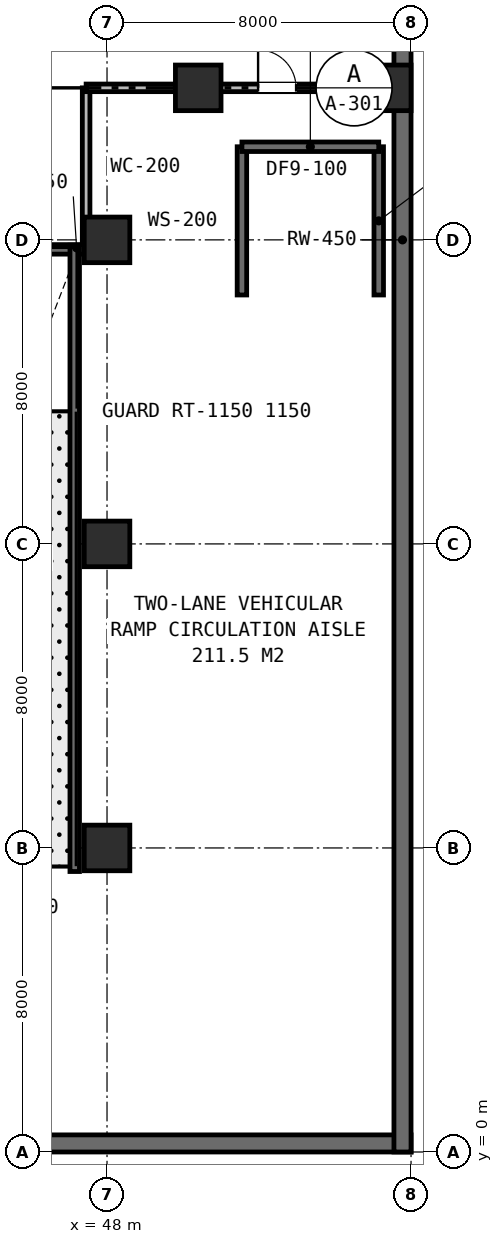
"""IFC4 building model, lengths in metres.
Left out: names, types, materials, properties, quantities, classifications, styles, units other than length and angle.
Written with IfcOpenShell. Run it as: python <this file> out.ifc"""

import sys

from ifc_helpers import new_model, si_unit, direction, frame, frame_2d, origin, origin_2d, place, context, subcontext, project, spatial, rectangle, extrude, element, fill, save


model = new_model("IFC4")
c1 = context("Model", 3, precision=1e-05, world=origin(), true_north=direction((0.0, 1.0)))
c2 = subcontext(c1, "Body", "Model", "MODEL_VIEW")
j1 = project(units=[si_unit("LENGTHUNIT", "METRE"), si_unit("PLANEANGLEUNIT", "RADIAN")], contexts=[c1])
p1 = place(None, origin())
s1 = spatial("IfcSite", under=j1, at=p1, CompositionType="ELEMENT")
p2 = place(p1, origin())
s2 = spatial("IfcBuilding", under=s1, at=p2, CompositionType="ELEMENT")
p3 = place(p2, frame((0.0, 0.0, -9.4)))
s3 = spatial("IfcBuildingStorey", under=s2, at=p3, CompositionType="ELEMENT", Elevation=-9.4)
p4 = place(p3, frame((0.0, 0.225, 0.0), z_axis=(0.0, 0.0, 1.0), x_axis=(1.0, 0.0, 0.0)))
e1 = element("IfcWall", 1, at=p4, inside=s3, PredefinedType="USERDEFINED", context=c2, shape_type="SweptSolid", body=[
    extrude(rectangle(XDim=56.0, YDim=0.45, at=frame_2d((28.0, 0.0))), origin(), (0.0, 0.0, 1.0), 3.8),
])
p5 = place(p3, frame((55.775, 0.0, 0.0), z_axis=(0.0, 0.0, 1.0), x_axis=(0.0, 1.0, 0.0)))
e2 = element("IfcWall", 2, at=p5, inside=s3, PredefinedType="USERDEFINED", context=c2, shape_type="SweptSolid", body=[
    extrude(rectangle(XDim=48.0, YDim=0.45, at=frame_2d((24.0, 0.0))), origin(), (0.0, 0.0, 1.0), 3.8),
])
for number, where, z_axis, x_axis in (
    (3, (50.4, 28.0, 0.0), (0.0, 0.0, 1.0), (1.0, 0.0, 0.0)),
    (4, (55.4, 28.0, 0.0), (0.0, 0.0, 1.0), (1.0, 0.0, 0.0)),
    (5, (48.0, 8.0, 0.0), (0.0, 0.0, 1.0), (1.0, 0.0, 0.0)),
    (6, (48.0, 16.0, 0.0), (0.0, 0.0, 1.0), (1.0, 0.0, 0.0)),
    (7, (48.0, 24.0, 0.0), (0.0, 0.0, 1.0), (1.0, 0.0, 0.0)),
):
    element("IfcColumn", number, at=place(p3, frame(where, z_axis=z_axis, x_axis=x_axis)), inside=s3, PredefinedType="COLUMN", context=c2, shape_type="SweptSolid", body=[
        extrude(rectangle(XDim=1.2, YDim=1.2, at=origin_2d()), origin(), (0.0, 0.0, 1.0), 3.8),
    ])
p6 = place(p3, frame((47.45, 23.85, 0.0), z_axis=(0.0, 0.0, 1.0), x_axis=(0.0, 1.0, 0.0)))
e8 = element("IfcWall", 8, at=p6, inside=s3, PredefinedType="PARTITIONING", context=c2, shape_type="SweptSolid", body=[
    extrude(rectangle(XDim=4.15, YDim=0.2, at=frame_2d((2.075, 0.0))), origin(), (0.0, 0.0, 1.0), 2.88),
])
p7 = place(p3, frame((47.45, 28.0, 0.0), z_axis=(0.0, 0.0, 1.0), x_axis=(1.0, 0.0, 0.0)))
e9 = element("IfcWall", 9, at=p7, inside=s3, PredefinedType="PARTITIONING", context=c2, shape_type="SweptSolid", body=[
    extrude(rectangle(XDim=8.0, YDim=0.2, at=frame_2d((4.0, 0.0))), origin(), (0.0, 0.0, 1.0), 2.88),
])
p8 = place(p7, frame((4.525, 0.0, 0.0)))
e10 = element("IfcOpeningElement", 10, at=p8, cuts=e9, PredefinedType="OPENING", context=c2, shape_type="SweptSolid", body=[
    extrude(rectangle(XDim=1.0, YDim=2.15, at=frame_2d((0.5, 1.075))), frame((0.0, 0.11, 0.0), z_axis=(0.0, -1.0, 0.0), x_axis=(1.0, 0.0, 0.0)), (0.0, 0.0, 1.0), 0.22),
])
p9 = place(p3, frame((40.0, 23.75, 0.0), z_axis=(0.0, 0.0, 1.0), x_axis=(1.0, 0.0, 0.0)))
e11 = element("IfcWall", 11, at=p9, inside=s3, PredefinedType="STANDARD", context=c2, shape_type="SweptSolid", body=[
    extrude(rectangle(XDim=8.0, YDim=0.25, at=frame_2d((4.0, 0.0))), origin(), (0.0, 0.0, 1.0), 3.5),
])
p10 = place(p3, frame((47.15, 7.38, 0.0), z_axis=(0.0, 0.0, 1.0), x_axis=(0.0, 1.0, 0.0)))
e12 = element("IfcWall", 12, at=p10, inside=s3, PredefinedType="STANDARD", context=c2, shape_type="SweptSolid", body=[
    extrude(rectangle(XDim=16.48, YDim=0.25, at=frame_2d((8.24, 0.0))), origin(), (0.0, 0.0, 1.0), 3.5),
])
for number, where, z_axis, x_axis in (
    (13, (51.55, 22.55, 0.0), (0.0, 0.0, 1.0), (0.0, 1.0, 0.0)),
    (14, (55.15, 22.55, 0.0), (0.0, 0.0, 1.0), (0.0, 1.0, 0.0)),
):
    element("IfcWall", number, at=place(p3, frame(where, z_axis=z_axis, x_axis=x_axis)), inside=s3, PredefinedType="STANDARD", context=c2, shape_type="SweptSolid", body=[
        extrude(rectangle(XDim=3.9, YDim=0.25, at=frame_2d((1.95, 0.0))), origin(), (0.0, 0.0, 1.0), 3.8),
    ])
p11 = place(p3, frame((51.55, 26.45, 0.0), z_axis=(0.0, 0.0, 1.0), x_axis=(1.0, 0.0, 0.0)))
e15 = element("IfcWall", 15, at=p11, inside=s3, PredefinedType="STANDARD", context=c2, shape_type="SweptSolid", body=[
    extrude(rectangle(XDim=3.6, YDim=0.25, at=frame_2d((1.8, 0.0))), origin(), (0.0, 0.0, 1.0), 3.8),
])
p12 = place(p8, origin())
e16 = element("IfcDoor", 16, at=p12, inside=s3, OperationType="SINGLE_SWING_LEFT", PredefinedType="DOOR", context=c2, shape_type="SweptSolid", body=[
    extrude(rectangle(XDim=1.0, YDim=2.15, at=frame_2d((0.5, 1.075))), frame((0.0, 0.025, 0.0), z_axis=(0.0, -1.0, 0.0), x_axis=(1.0, 0.0, 0.0)), (0.0, 0.0, 1.0), 0.05),
])
fill(e10, e16)
save(model, sys.argv[1])
